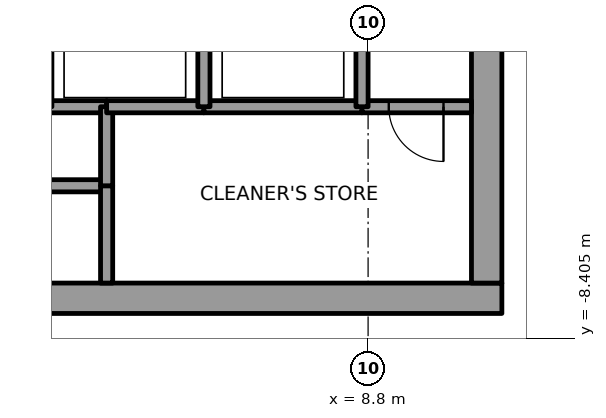
"""IFC4 building model, lengths in metres.
Left out: names, types, materials, properties, quantities, classifications, styles, units other than length and angle.
Written with IfcOpenShell. Run it as: python <this file> out.ifc"""

import sys

from ifc_helpers import new_model, si_unit, direction, frame, frame_2d, origin, place, context, subcontext, project, spatial, rectangle, extrude, element, fill, save


model = new_model("IFC4")
c1 = context("Model", 3, precision=1e-05, world=origin(), true_north=direction((0.0, 1.0)))
c2 = subcontext(c1, "Body", "Model", "MODEL_VIEW")
j1 = project(units=[si_unit("LENGTHUNIT", "METRE"), si_unit("PLANEANGLEUNIT", "RADIAN")], contexts=[c1])
p1 = place(None, origin())
s1 = spatial("IfcSite", under=j1, at=p1, CompositionType="ELEMENT")
p2 = place(p1, origin())
s2 = spatial("IfcBuilding", under=s1, at=p2, CompositionType="ELEMENT")
p3 = place(p2, frame((0.0, 0.0, 271.0)))
s3 = spatial("IfcBuildingStorey", under=s2, at=p3, CompositionType="ELEMENT", Elevation=271.0)
p4 = place(p3, frame((-11.0, -7.75, 0.0), z_axis=(0.0, 0.0, 1.0), x_axis=(1.0, 0.0, 0.0)))
e1 = element("IfcWall", 1, at=p4, inside=s3, PredefinedType="SHEAR", context=c2, shape_type="SweptSolid", body=[
    extrude(rectangle(XDim=22.0, YDim=0.5, at=frame_2d((11.0, 0.0))), origin(), (0.0, 0.0, 1.0), 4.0),
])
p5 = place(p4, frame((10.45, 0.0, 0.0)))
e2 = element("IfcOpeningElement", 2, at=p5, cuts=e1, PredefinedType="OPENING", context=c2, shape_type="SweptSolid", body=[
    extrude(rectangle(XDim=1.1, YDim=2.1, at=frame_2d((0.55, 1.05))), frame((0.0, 0.25, 0.0), z_axis=(0.0, -1.0, 0.0), x_axis=(1.0, 0.0, 0.0)), (0.0, 0.0, 1.0), 0.5),
])
p6 = place(p3, frame((10.75, -7.5, 0.0), z_axis=(0.0, 0.0, 1.0), x_axis=(0.0, 1.0, 0.0)))
e3 = element("IfcWall", 3, at=p6, inside=s3, PredefinedType="SHEAR", context=c2, shape_type="SweptSolid", body=[
    extrude(rectangle(XDim=15.0, YDim=0.5, at=frame_2d((7.5, 0.0))), origin(), (0.0, 0.0, 1.0), 4.0),
])
p7 = place(p6, frame((6.6, 0.0, 0.0)))
e4 = element("IfcOpeningElement", 4, at=p7, cuts=e3, PredefinedType="OPENING", context=c2, shape_type="SweptSolid", body=[
    extrude(rectangle(XDim=1.8, YDim=2.1, at=frame_2d((0.9, 1.05))), frame((0.0, 0.25, 0.0), z_axis=(0.0, -1.0, 0.0), x_axis=(1.0, 0.0, 0.0)), (0.0, 0.0, 1.0), 0.5),
])
p8 = place(p3, frame((4.5, -5.9, 0.0), z_axis=(0.0, 0.0, 1.0), x_axis=(-1.0, 0.0, 0.0)))
e5 = element("IfcWall", 5, at=p8, inside=s3, PredefinedType="SOLIDWALL", context=c2, shape_type="SweptSolid", body=[
    extrude(rectangle(XDim=2.5, YDim=0.2, at=frame_2d((1.25, 0.0))), origin(), (0.0, 0.0, 1.0), 3.85),
])
p9 = place(p3, frame((4.5, -4.6, 0.0), z_axis=(0.0, 0.0, 1.0), x_axis=(-1.0, 0.0, 0.0)))
e6 = element("IfcWall", 6, at=p9, inside=s3, PredefinedType="SOLIDWALL", context=c2, shape_type="SweptSolid", body=[
    extrude(rectangle(XDim=1.0, YDim=0.2, at=frame_2d((0.5, 0.0))), origin(), (0.0, 0.0, 1.0), 3.85),
])
p10 = place(p3, frame((4.5, -5.9, 0.0), z_axis=(0.0, 0.0, 1.0), x_axis=(0.0, -1.0, 0.0)))
e7 = element("IfcWall", 7, at=p10, inside=s3, PredefinedType="SOLIDWALL", context=c2, shape_type="SweptSolid", body=[
    extrude(rectangle(XDim=1.6, YDim=0.2, at=frame_2d((0.8, 0.0))), origin(), (0.0, 0.0, 1.0), 3.85),
])
p11 = place(p3, frame((4.5, -4.6, 0.0), z_axis=(0.0, 0.0, 1.0), x_axis=(0.0, -1.0, 0.0)))
e8 = element("IfcWall", 8, at=p11, inside=s3, PredefinedType="SOLIDWALL", context=c2, shape_type="SweptSolid", body=[
    extrude(rectangle(XDim=1.3, YDim=0.2, at=frame_2d((0.65, 0.0))), origin(), (0.0, 0.0, 1.0), 3.85),
])
p12 = place(p3, frame((6.1, -4.6, 0.0), z_axis=(0.0, 0.0, 1.0), x_axis=(-1.0, 0.0, 0.0)))
e9 = element("IfcWall", 9, at=p12, inside=s3, PredefinedType="SOLIDWALL", context=c2, shape_type="SweptSolid", body=[
    extrude(rectangle(XDim=1.6, YDim=0.2, at=frame_2d((0.8, 0.0))), origin(), (0.0, 0.0, 1.0), 3.85),
])
p13 = place(p3, frame((8.7, -4.6, 0.0), z_axis=(0.0, 0.0, 1.0), x_axis=(-1.0, 0.0, 0.0)))
e10 = element("IfcWall", 10, at=p13, inside=s3, PredefinedType="SOLIDWALL", context=c2, shape_type="SweptSolid", body=[
    extrude(rectangle(XDim=2.6, YDim=0.2, at=frame_2d((1.3, 0.0))), origin(), (0.0, 0.0, 1.0), 3.85),
])
p14 = place(p3, frame((6.1, -4.6, 0.0), z_axis=(0.0, 0.0, 1.0), x_axis=(0.0, 1.0, 0.0)))
e11 = element("IfcWall", 11, at=p14, inside=s3, PredefinedType="SOLIDWALL", context=c2, shape_type="SweptSolid", body=[
    extrude(rectangle(XDim=2.8, YDim=0.2, at=frame_2d((1.4, 0.0))), origin(), (0.0, 0.0, 1.0), 3.85),
])
p15 = place(p3, frame((10.5, -4.6, 0.0), z_axis=(0.0, 0.0, 1.0), x_axis=(-1.0, 0.0, 0.0)))
e12 = element("IfcWall", 12, at=p15, inside=s3, PredefinedType="SOLIDWALL", context=c2, shape_type="SweptSolid", body=[
    extrude(rectangle(XDim=1.8, YDim=0.2, at=frame_2d((0.9, 0.0))), origin(), (0.0, 0.0, 1.0), 3.85),
])
p16 = place(p15, frame((0.46, 0.0, 0.0)))
e13 = element("IfcOpeningElement", 13, at=p16, cuts=e12, PredefinedType="OPENING", context=c2, shape_type="SweptSolid", body=[
    extrude(rectangle(XDim=0.9, YDim=2.1, at=frame_2d((0.45, 1.05))), frame((0.0, 0.1, 0.0), z_axis=(0.0, -1.0, 0.0), x_axis=(1.0, 0.0, 0.0)), (0.0, 0.0, 1.0), 0.2),
])
p17 = place(p3, frame((8.7, -1.8, 0.0), z_axis=(0.0, 0.0, 1.0), x_axis=(0.0, -1.0, 0.0)))
e14 = element("IfcWall", 14, at=p17, inside=s3, PredefinedType="SOLIDWALL", context=c2, shape_type="SweptSolid", body=[
    extrude(rectangle(XDim=2.8, YDim=0.2, at=frame_2d((1.4, 0.0))), origin(), (0.0, 0.0, 1.0), 3.85),
])
p18 = place(p16, origin())
e15 = element("IfcDoor", 15, at=p18, inside=s3, OperationType="SINGLE_SWING_RIGHT", PredefinedType="DOOR", context=c2, shape_type="SweptSolid", body=[
    extrude(rectangle(XDim=0.9, YDim=2.1, at=frame_2d((0.45, 1.05))), frame((0.0, 0.025, 0.0), z_axis=(0.0, -1.0, 0.0), x_axis=(1.0, 0.0, 0.0)), (0.0, 0.0, 1.0), 0.05),
])
fill(e13, e15)
save(model, sys.argv[1])
